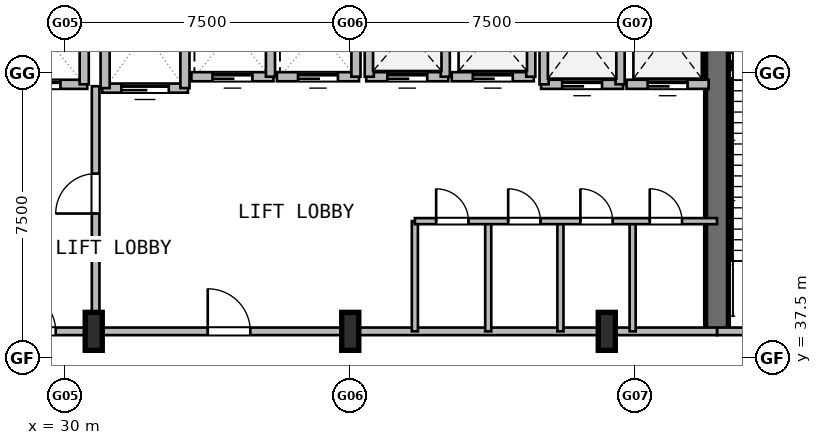
"""IFC4 building model, lengths in metres.
Left out: names, types, materials, properties, quantities, classifications, styles, units other than length and angle.
Written with IfcOpenShell. Run it as: python <this file> out.ifc"""

import sys

from ifc_helpers import new_model, si_unit, direction, frame, frame_2d, origin, origin_2d, place, context, subcontext, project, spatial, rectangle, i_section, extrude, element, fill, save


model = new_model("IFC4")
c1 = context("Model", 3, precision=1e-05, world=origin(), true_north=direction((0.0, 1.0)))
c2 = subcontext(c1, "Body", "Model", "MODEL_VIEW")
j1 = project(units=[si_unit("LENGTHUNIT", "METRE"), si_unit("PLANEANGLEUNIT", "RADIAN")], contexts=[c1])
p1 = place(None, origin())
s1 = spatial("IfcSite", under=j1, at=p1, CompositionType="ELEMENT")
p2 = place(p1, origin())
s2 = spatial("IfcBuilding", under=s1, at=p2, CompositionType="ELEMENT")
p3 = place(p2, origin())
s3 = spatial("IfcBuildingStorey", under=s2, at=p3, CompositionType="ELEMENT", Elevation=0.0)
p4 = place(p3, frame((47.15, 38.2, 0.0), z_axis=(0.0, 0.0, 1.0), x_axis=(0.0, 1.0, 0.0)))
e1 = element("IfcWall", 1, at=p4, inside=s3, PredefinedType="SHEAR", context=c2, shape_type="SweptSolid", body=[
    extrude(rectangle(XDim=9.8, YDim=0.6, at=frame_2d((4.9, 0.0))), origin(), (0.0, 0.0, 1.0), 6.0),
])
for number, where, z_axis, x_axis in (
    (2, (30.75, 38.2, 0.0), (0.0, 0.0, 1.0), (1.0, 0.0, 0.0)),
    (3, (37.5, 38.2, 0.0), (0.0, 0.0, 1.0), (1.0, 0.0, 0.0)),
    (4, (44.25, 38.2, 0.0), (0.0, 0.0, 1.0), (1.0, 0.0, 0.0)),
):
    element("IfcColumn", number, at=place(p3, frame(where, z_axis=z_axis, x_axis=x_axis)), inside=s3, PredefinedType="COLUMN", context=c2, shape_type="SweptSolid", body=[
        extrude(i_section(OverallWidth=0.45, OverallDepth=1.0, WebThickness=0.022, FlangeThickness=0.04, at=origin_2d()), origin(), (0.0, 0.0, 1.0), 6.0),
    ])
p5 = place(p3, frame((51.0, 38.2, 0.0), z_axis=(0.0, 0.0, 1.0), x_axis=(-1.0, 0.0, 0.0)))
e5 = element("IfcWall", 5, at=p5, inside=s3, PredefinedType="PARTITIONING", context=c2, shape_type="SweptSolid", body=[
    extrude(rectangle(XDim=3.85, YDim=0.2, at=frame_2d((1.925, 0.0))), origin(), (0.0, 0.0, 1.0), 4.88),
])
p6 = place(p5, frame((0.75, 0.0, 0.0)))
e6 = element("IfcOpeningElement", 6, at=p6, cuts=e5, PredefinedType="OPENING", context=c2, shape_type="SweptSolid", body=[
    extrude(rectangle(XDim=1.12, YDim=2.1, at=frame_2d((0.56, 1.05))), frame((0.0, 0.11, 0.0), z_axis=(0.0, -1.0, 0.0), x_axis=(1.0, 0.0, 0.0)), (0.0, 0.0, 1.0), 0.22),
])
p7 = place(p3, frame((30.8, 38.2, 0.0), z_axis=(0.0, 0.0, 1.0), x_axis=(0.0, 1.0, 0.0)))
e7 = element("IfcWall", 7, at=p7, inside=s3, PredefinedType="PARTITIONING", context=c2, shape_type="SweptSolid", body=[
    extrude(rectangle(XDim=6.45, YDim=0.2, at=frame_2d((3.225, 0.0))), origin(), (0.0, 0.0, 1.0), 4.88),
])
p8 = place(p7, frame((3.1, 0.0, 0.0)))
e8 = element("IfcOpeningElement", 8, at=p8, cuts=e7, PredefinedType="OPENING", context=c2, shape_type="SweptSolid", body=[
    extrude(rectangle(XDim=1.05, YDim=2.1, at=frame_2d((0.525, 1.05))), frame((0.0, 0.11, 0.0), z_axis=(0.0, -1.0, 0.0), x_axis=(1.0, 0.0, 0.0)), (0.0, 0.0, 1.0), 0.22),
])
p9 = place(p3, frame((27.95, 38.2, 0.0), z_axis=(0.0, 0.0, 1.0), x_axis=(1.0, 0.0, 0.0)))
e9 = element("IfcWall", 9, at=p9, inside=s3, PredefinedType="PARTITIONING", context=c2, shape_type="SweptSolid", body=[
    extrude(rectangle(XDim=2.85, YDim=0.2, at=frame_2d((1.425, 0.0))), origin(), (0.0, 0.0, 1.0), 4.88),
])
p10 = place(p9, frame((0.75, 0.0, 0.0)))
e10 = element("IfcOpeningElement", 10, at=p10, cuts=e9, PredefinedType="OPENING", context=c2, shape_type="SweptSolid", body=[
    extrude(rectangle(XDim=1.05, YDim=2.1, at=frame_2d((0.525, 1.05))), frame((0.0, 0.11, 0.0), z_axis=(0.0, -1.0, 0.0), x_axis=(1.0, 0.0, 0.0)), (0.0, 0.0, 1.0), 0.22),
])
p11 = place(p3, frame((30.8, 38.2, 0.0), z_axis=(0.0, 0.0, 1.0), x_axis=(1.0, 0.0, 0.0)))
e11 = element("IfcWall", 11, at=p11, inside=s3, PredefinedType="PARTITIONING", context=c2, shape_type="SweptSolid", body=[
    extrude(rectangle(XDim=16.35, YDim=0.2, at=frame_2d((8.175, 0.0))), origin(), (0.0, 0.0, 1.0), 4.88),
])
p12 = place(p11, frame((2.95, 0.0, 0.0)))
e12 = element("IfcOpeningElement", 12, at=p12, cuts=e11, PredefinedType="OPENING", context=c2, shape_type="SweptSolid", body=[
    extrude(rectangle(XDim=1.12, YDim=2.1, at=frame_2d((0.56, 1.05))), frame((0.0, 0.11, 0.0), z_axis=(0.0, -1.0, 0.0), x_axis=(1.0, 0.0, 0.0)), (0.0, 0.0, 1.0), 0.22),
])
p13 = place(p3, frame((28.22, 44.7, 0.0), z_axis=(0.0, 0.0, 1.0), x_axis=(1.0, 0.0, 0.0)))
e13 = element("IfcWall", 13, at=p13, inside=s3, PredefinedType="PARTITIONING", context=c2, shape_type="SweptSolid", body=[
    extrude(rectangle(XDim=2.36, YDim=0.24, at=frame_2d((1.18, 0.0))), origin(), (0.0, 0.0, 1.0), 5.68),
])
p14 = place(p13, frame((0.705, 0.0, 0.0)))
e14 = element("IfcOpeningElement", 14, at=p14, cuts=e13, PredefinedType="OPENING", context=c2, shape_type="SweptSolid", body=[
    extrude(rectangle(XDim=0.95, YDim=2.15, at=frame_2d((0.475, 1.075))), frame((0.0, 0.13, 0.0), z_axis=(0.0, -1.0, 0.0), x_axis=(1.0, 0.0, 0.0)), (0.0, 0.0, 1.0), 0.26),
])
p15 = place(p3, frame((30.5, 44.7, 0.0), z_axis=(0.0, 0.0, 1.0), x_axis=(0.0, 1.0, 0.0)))
e15 = element("IfcWall", 15, at=p15, inside=s3, PredefinedType="PARTITIONING", context=c2, shape_type="SweptSolid", body=[
    extrude(rectangle(XDim=2.7, YDim=0.24, at=frame_2d((1.35, 0.0))), origin(), (0.0, 0.0, 1.0), 4.88),
])
p16 = place(p3, frame((30.97, 44.6, 0.0), z_axis=(0.0, 0.0, 1.0), x_axis=(1.0, 0.0, 0.0)))
e16 = element("IfcWall", 16, at=p16, inside=s3, PredefinedType="PARTITIONING", context=c2, shape_type="SweptSolid", body=[
    extrude(rectangle(XDim=2.26, YDim=0.24, at=frame_2d((1.13, 0.0))), origin(), (0.0, 0.0, 1.0), 5.68),
])
p17 = place(p16, frame((0.505, 0.0, 0.0)))
e17 = element("IfcOpeningElement", 17, at=p17, cuts=e16, PredefinedType="OPENING", context=c2, shape_type="SweptSolid", body=[
    extrude(rectangle(XDim=1.25, YDim=2.2, at=frame_2d((0.625, 1.1))), frame((0.0, 0.13, 0.0), z_axis=(0.0, -1.0, 0.0), x_axis=(1.0, 0.0, 0.0)), (0.0, 0.0, 1.0), 0.26),
])
p18 = place(p3, frame((31.05, 44.6, 0.0), z_axis=(0.0, 0.0, 1.0), x_axis=(0.0, 1.0, 0.0)))
e18 = element("IfcWall", 18, at=p18, inside=s3, PredefinedType="PARTITIONING", context=c2, shape_type="SweptSolid", body=[
    extrude(rectangle(XDim=2.9, YDim=0.24, at=frame_2d((1.45, 0.0))), origin(), (0.0, 0.0, 1.0), 4.88),
])
p19 = place(p3, frame((33.15, 44.6, 0.0), z_axis=(0.0, 0.0, 1.0), x_axis=(0.0, 1.0, 0.0)))
e19 = element("IfcWall", 19, at=p19, inside=s3, PredefinedType="PARTITIONING", context=c2, shape_type="SweptSolid", body=[
    extrude(rectangle(XDim=2.9, YDim=0.24, at=frame_2d((1.45, 0.0))), origin(), (0.0, 0.0, 1.0), 5.68),
])
p20 = place(p3, frame((33.32, 44.9, 0.0), z_axis=(0.0, 0.0, 1.0), x_axis=(1.0, 0.0, 0.0)))
e20 = element("IfcWall", 20, at=p20, inside=s3, PredefinedType="PARTITIONING", context=c2, shape_type="SweptSolid", body=[
    extrude(rectangle(XDim=2.16, YDim=0.24, at=frame_2d((1.08, 0.0))), origin(), (0.0, 0.0, 1.0), 5.68),
])
p21 = place(p20, frame((0.555, 0.0, 0.0)))
e21 = element("IfcOpeningElement", 21, at=p21, cuts=e20, PredefinedType="OPENING", context=c2, shape_type="SweptSolid", body=[
    extrude(rectangle(XDim=1.05, YDim=2.15, at=frame_2d((0.525, 1.075))), frame((0.0, 0.13, 0.0), z_axis=(0.0, -1.0, 0.0), x_axis=(1.0, 0.0, 0.0)), (0.0, 0.0, 1.0), 0.26),
])
p22 = place(p3, frame((35.4, 44.9, 0.0), z_axis=(0.0, 0.0, 1.0), x_axis=(0.0, 1.0, 0.0)))
e22 = element("IfcWall", 22, at=p22, inside=s3, PredefinedType="PARTITIONING", context=c2, shape_type="SweptSolid", body=[
    extrude(rectangle(XDim=2.4, YDim=0.24, at=frame_2d((1.2, 0.0))), origin(), (0.0, 0.0, 1.0), 5.68),
])
p23 = place(p3, frame((35.57, 44.9, 0.0), z_axis=(0.0, 0.0, 1.0), x_axis=(1.0, 0.0, 0.0)))
e23 = element("IfcWall", 23, at=p23, inside=s3, PredefinedType="PARTITIONING", context=c2, shape_type="SweptSolid", body=[
    extrude(rectangle(XDim=2.16, YDim=0.24, at=frame_2d((1.08, 0.0))), origin(), (0.0, 0.0, 1.0), 5.68),
])
p24 = place(p23, frame((0.555, 0.0, 0.0)))
e24 = element("IfcOpeningElement", 24, at=p24, cuts=e23, PredefinedType="OPENING", context=c2, shape_type="SweptSolid", body=[
    extrude(rectangle(XDim=1.05, YDim=2.15, at=frame_2d((0.525, 1.075))), frame((0.0, 0.13, 0.0), z_axis=(0.0, -1.0, 0.0), x_axis=(1.0, 0.0, 0.0)), (0.0, 0.0, 1.0), 0.26),
])
p25 = place(p3, frame((37.65, 44.9, 0.0), z_axis=(0.0, 0.0, 1.0), x_axis=(0.0, 1.0, 0.0)))
e25 = element("IfcWall", 25, at=p25, inside=s3, PredefinedType="PARTITIONING", context=c2, shape_type="SweptSolid", body=[
    extrude(rectangle(XDim=2.4, YDim=0.24, at=frame_2d((1.2, 0.0))), origin(), (0.0, 0.0, 1.0), 5.68),
])
p26 = place(p3, frame((37.92, 44.9, 0.0), z_axis=(0.0, 0.0, 1.0), x_axis=(1.0, 0.0, 0.0)))
e26 = element("IfcWall", 26, at=p26, inside=s3, PredefinedType="PARTITIONING", context=c2, shape_type="SweptSolid", body=[
    extrude(rectangle(XDim=2.16, YDim=0.24, at=frame_2d((1.08, 0.0))), origin(), (0.0, 0.0, 1.0), 5.68),
])
p27 = place(p26, frame((0.555, 0.0, 0.0)))
e27 = element("IfcOpeningElement", 27, at=p27, cuts=e26, PredefinedType="OPENING", context=c2, shape_type="SweptSolid", body=[
    extrude(rectangle(XDim=1.05, YDim=2.15, at=frame_2d((0.525, 1.075))), frame((0.0, 0.13, 0.0), z_axis=(0.0, -1.0, 0.0), x_axis=(1.0, 0.0, 0.0)), (0.0, 0.0, 1.0), 0.26),
])
for number, where, z_axis, x_axis in (
    (28, (38.0, 44.9, 0.0), (0.0, 0.0, 1.0), (0.0, 1.0, 0.0)),
    (29, (40.0, 44.9, 0.0), (0.0, 0.0, 1.0), (0.0, 1.0, 0.0)),
):
    element("IfcWall", number, at=place(p3, frame(where, z_axis=z_axis, x_axis=x_axis)), inside=s3, PredefinedType="PARTITIONING", context=c2, shape_type="SweptSolid", body=[
        extrude(rectangle(XDim=2.4, YDim=0.24, at=frame_2d((1.2, 0.0))), origin(), (0.0, 0.0, 1.0), 5.68),
    ])
p28 = place(p3, frame((40.17, 44.9, 0.0), z_axis=(0.0, 0.0, 1.0), x_axis=(1.0, 0.0, 0.0)))
e30 = element("IfcWall", 30, at=p28, inside=s3, PredefinedType="PARTITIONING", context=c2, shape_type="SweptSolid", body=[
    extrude(rectangle(XDim=2.16, YDim=0.24, at=frame_2d((1.08, 0.0))), origin(), (0.0, 0.0, 1.0), 5.68),
])
p29 = place(p28, frame((0.555, 0.0, 0.0)))
e31 = element("IfcOpeningElement", 31, at=p29, cuts=e30, PredefinedType="OPENING", context=c2, shape_type="SweptSolid", body=[
    extrude(rectangle(XDim=1.05, YDim=2.15, at=frame_2d((0.525, 1.075))), frame((0.0, 0.13, 0.0), z_axis=(0.0, -1.0, 0.0), x_axis=(1.0, 0.0, 0.0)), (0.0, 0.0, 1.0), 0.26),
])
p30 = place(p3, frame((42.25, 44.9, 0.0), z_axis=(0.0, 0.0, 1.0), x_axis=(0.0, 1.0, 0.0)))
e32 = element("IfcWall", 32, at=p30, inside=s3, PredefinedType="PARTITIONING", context=c2, shape_type="SweptSolid", body=[
    extrude(rectangle(XDim=2.4, YDim=0.24, at=frame_2d((1.2, 0.0))), origin(), (0.0, 0.0, 1.0), 5.68),
])
p31 = place(p3, frame((42.52, 44.7, 0.0), z_axis=(0.0, 0.0, 1.0), x_axis=(1.0, 0.0, 0.0)))
e33 = element("IfcWall", 33, at=p31, inside=s3, PredefinedType="PARTITIONING", context=c2, shape_type="SweptSolid", body=[
    extrude(rectangle(XDim=2.16, YDim=0.24, at=frame_2d((1.08, 0.0))), origin(), (0.0, 0.0, 1.0), 5.68),
])
p32 = place(p31, frame((0.555, 0.0, 0.0)))
e34 = element("IfcOpeningElement", 34, at=p32, cuts=e33, PredefinedType="OPENING", context=c2, shape_type="SweptSolid", body=[
    extrude(rectangle(XDim=1.05, YDim=2.15, at=frame_2d((0.525, 1.075))), frame((0.0, 0.13, 0.0), z_axis=(0.0, -1.0, 0.0), x_axis=(1.0, 0.0, 0.0)), (0.0, 0.0, 1.0), 0.26),
])
for number, where, z_axis, x_axis in (
    (35, (42.6, 44.7, 0.0), (0.0, 0.0, 1.0), (0.0, 1.0, 0.0)),
    (36, (44.6, 44.7, 0.0), (0.0, 0.0, 1.0), (0.0, 1.0, 0.0)),
):
    element("IfcWall", number, at=place(p3, frame(where, z_axis=z_axis, x_axis=x_axis)), inside=s3, PredefinedType="PARTITIONING", context=c2, shape_type="SweptSolid", body=[
        extrude(rectangle(XDim=2.7, YDim=0.24, at=frame_2d((1.35, 0.0))), origin(), (0.0, 0.0, 1.0), 5.68),
    ])
p33 = place(p3, frame((44.77, 44.7, 0.0), z_axis=(0.0, 0.0, 1.0), x_axis=(1.0, 0.0, 0.0)))
e37 = element("IfcWall", 37, at=p33, inside=s3, PredefinedType="PARTITIONING", context=c2, shape_type="SweptSolid", body=[
    extrude(rectangle(XDim=2.16, YDim=0.24, at=frame_2d((1.08, 0.0))), origin(), (0.0, 0.0, 1.0), 5.68),
])
p34 = place(p33, frame((0.555, 0.0, 0.0)))
e38 = element("IfcOpeningElement", 38, at=p34, cuts=e37, PredefinedType="OPENING", context=c2, shape_type="SweptSolid", body=[
    extrude(rectangle(XDim=1.05, YDim=2.15, at=frame_2d((0.525, 1.075))), frame((0.0, 0.13, 0.0), z_axis=(0.0, -1.0, 0.0), x_axis=(1.0, 0.0, 0.0)), (0.0, 0.0, 1.0), 0.26),
])
for number, where, z_axis, x_axis in (
    (39, (39.2, 38.2, 0.0), (0.0, 0.0, 1.0), (0.0, 1.0, 0.0)),
    (40, (41.13, 38.2, 0.0), (0.0, 0.0, 1.0), (0.0, 1.0, 0.0)),
    (41, (43.03, 38.2, 0.0), (0.0, 0.0, 1.0), (0.0, 1.0, 0.0)),
    (42, (44.93, 38.2, 0.0), (0.0, 0.0, 1.0), (0.0, 1.0, 0.0)),
):
    element("IfcWall", number, at=place(p3, frame(where, z_axis=z_axis, x_axis=x_axis)), inside=s3, PredefinedType="PARTITIONING", context=c2, shape_type="SweptSolid", body=[
        extrude(rectangle(XDim=2.9, YDim=0.16, at=frame_2d((1.45, 0.0))), origin(), (0.0, 0.0, 1.0), 5.68),
    ])
p35 = place(p3, frame((39.2, 41.1, 0.0), z_axis=(0.0, 0.0, 1.0), x_axis=(1.0, 0.0, 0.0)))
e43 = element("IfcWall", 43, at=p35, inside=s3, PredefinedType="PARTITIONING", context=c2, shape_type="SweptSolid", body=[
    extrude(rectangle(XDim=7.95, YDim=0.16, at=frame_2d((3.975, 0.0))), origin(), (0.0, 0.0, 1.0), 5.68),
])
p36 = place(p35, frame((0.56, 0.0, 0.0)))
e44 = element("IfcOpeningElement", 44, at=p36, cuts=e43, PredefinedType="OPENING", context=c2, shape_type="SweptSolid", body=[
    extrude(rectangle(XDim=0.85, YDim=2.05, at=frame_2d((0.425, 1.025))), frame((0.0, 0.09, 0.0), z_axis=(0.0, -1.0, 0.0), x_axis=(1.0, 0.0, 0.0)), (0.0, 0.0, 1.0), 0.18),
])
p37 = place(p35, frame((2.455, 0.0, 0.0)))
e45 = element("IfcOpeningElement", 45, at=p37, cuts=e43, PredefinedType="OPENING", context=c2, shape_type="SweptSolid", body=[
    extrude(rectangle(XDim=0.85, YDim=2.05, at=frame_2d((0.425, 1.025))), frame((0.0, 0.09, 0.0), z_axis=(0.0, -1.0, 0.0), x_axis=(1.0, 0.0, 0.0)), (0.0, 0.0, 1.0), 0.18),
])
p38 = place(p35, frame((4.355, 0.0, 0.0)))
e46 = element("IfcOpeningElement", 46, at=p38, cuts=e43, PredefinedType="OPENING", context=c2, shape_type="SweptSolid", body=[
    extrude(rectangle(XDim=0.85, YDim=2.05, at=frame_2d((0.425, 1.025))), frame((0.0, 0.09, 0.0), z_axis=(0.0, -1.0, 0.0), x_axis=(1.0, 0.0, 0.0)), (0.0, 0.0, 1.0), 0.18),
])
p39 = place(p35, frame((6.18, 0.0, 0.0)))
e47 = element("IfcOpeningElement", 47, at=p39, cuts=e43, PredefinedType="OPENING", context=c2, shape_type="SweptSolid", body=[
    extrude(rectangle(XDim=0.85, YDim=2.05, at=frame_2d((0.425, 1.025))), frame((0.0, 0.09, 0.0), z_axis=(0.0, -1.0, 0.0), x_axis=(1.0, 0.0, 0.0)), (0.0, 0.0, 1.0), 0.18),
])
p40 = place(p8, origin())
e48 = element("IfcDoor", 48, at=p40, inside=s3, OperationType="SINGLE_SWING_LEFT", PredefinedType="DOOR", context=c2, shape_type="SweptSolid", body=[
    extrude(rectangle(XDim=1.05, YDim=2.1, at=frame_2d((0.525, 1.05))), frame((0.0, 0.025, 0.0), z_axis=(0.0, -1.0, 0.0), x_axis=(1.0, 0.0, 0.0)), (0.0, 0.0, 1.0), 0.05),
])
fill(e8, e48)
p41 = place(p10, origin())
e49 = element("IfcDoor", 49, at=p41, inside=s3, OperationType="SINGLE_SWING_RIGHT", PredefinedType="DOOR", context=c2, shape_type="SweptSolid", body=[
    extrude(rectangle(XDim=1.05, YDim=2.1, at=frame_2d((0.525, 1.05))), frame((0.0, 0.025, 0.0), z_axis=(0.0, -1.0, 0.0), x_axis=(1.0, 0.0, 0.0)), (0.0, 0.0, 1.0), 0.05),
])
fill(e10, e49)
p42 = place(p12, origin())
e50 = element("IfcDoor", 50, at=p42, inside=s3, OperationType="SINGLE_SWING_LEFT", PredefinedType="DOOR", context=c2, shape_type="SweptSolid", body=[
    extrude(rectangle(XDim=1.12, YDim=2.1, at=frame_2d((0.56, 1.05))), frame((0.0, 0.025, 0.0), z_axis=(0.0, -1.0, 0.0), x_axis=(1.0, 0.0, 0.0)), (0.0, 0.0, 1.0), 0.05),
])
fill(e12, e50)
p43 = place(p14, origin())
e51 = element("IfcDoor", 51, at=p43, inside=s3, OperationType="SLIDING_TO_LEFT", PredefinedType="DOOR", context=c2, shape_type="SweptSolid", body=[
    extrude(rectangle(XDim=0.95, YDim=2.15, at=frame_2d((0.475, 1.075))), frame((0.0, 0.025, 0.0), z_axis=(0.0, -1.0, 0.0), x_axis=(1.0, 0.0, 0.0)), (0.0, 0.0, 1.0), 0.05),
])
fill(e14, e51)
p44 = place(p17, origin())
e52 = element("IfcDoor", 52, at=p44, inside=s3, OperationType="SLIDING_TO_LEFT", PredefinedType="DOOR", context=c2, shape_type="SweptSolid", body=[
    extrude(rectangle(XDim=1.25, YDim=2.2, at=frame_2d((0.625, 1.1))), frame((0.0, 0.025, 0.0), z_axis=(0.0, -1.0, 0.0), x_axis=(1.0, 0.0, 0.0)), (0.0, 0.0, 1.0), 0.05),
])
fill(e17, e52)
p45 = place(p21, origin())
e53 = element("IfcDoor", 53, at=p45, inside=s3, OperationType="SLIDING_TO_LEFT", PredefinedType="DOOR", context=c2, shape_type="SweptSolid", body=[
    extrude(rectangle(XDim=1.05, YDim=2.15, at=frame_2d((0.525, 1.075))), frame((0.0, 0.025, 0.0), z_axis=(0.0, -1.0, 0.0), x_axis=(1.0, 0.0, 0.0)), (0.0, 0.0, 1.0), 0.05),
])
fill(e21, e53)
p46 = place(p24, origin())
e54 = element("IfcDoor", 54, at=p46, inside=s3, OperationType="SLIDING_TO_LEFT", PredefinedType="DOOR", context=c2, shape_type="SweptSolid", body=[
    extrude(rectangle(XDim=1.05, YDim=2.15, at=frame_2d((0.525, 1.075))), frame((0.0, 0.025, 0.0), z_axis=(0.0, -1.0, 0.0), x_axis=(1.0, 0.0, 0.0)), (0.0, 0.0, 1.0), 0.05),
])
fill(e24, e54)
p47 = place(p27, origin())
e55 = element("IfcDoor", 55, at=p47, inside=s3, OperationType="SLIDING_TO_LEFT", PredefinedType="DOOR", context=c2, shape_type="SweptSolid", body=[
    extrude(rectangle(XDim=1.05, YDim=2.15, at=frame_2d((0.525, 1.075))), frame((0.0, 0.025, 0.0), z_axis=(0.0, -1.0, 0.0), x_axis=(1.0, 0.0, 0.0)), (0.0, 0.0, 1.0), 0.05),
])
fill(e27, e55)
p48 = place(p29, origin())
e56 = element("IfcDoor", 56, at=p48, inside=s3, OperationType="SLIDING_TO_LEFT", PredefinedType="DOOR", context=c2, shape_type="SweptSolid", body=[
    extrude(rectangle(XDim=1.05, YDim=2.15, at=frame_2d((0.525, 1.075))), frame((0.0, 0.025, 0.0), z_axis=(0.0, -1.0, 0.0), x_axis=(1.0, 0.0, 0.0)), (0.0, 0.0, 1.0), 0.05),
])
fill(e31, e56)
p49 = place(p32, origin())
e57 = element("IfcDoor", 57, at=p49, inside=s3, OperationType="SLIDING_TO_LEFT", PredefinedType="DOOR", context=c2, shape_type="SweptSolid", body=[
    extrude(rectangle(XDim=1.05, YDim=2.15, at=frame_2d((0.525, 1.075))), frame((0.0, 0.025, 0.0), z_axis=(0.0, -1.0, 0.0), x_axis=(1.0, 0.0, 0.0)), (0.0, 0.0, 1.0), 0.05),
])
fill(e34, e57)
p50 = place(p34, origin())
e58 = element("IfcDoor", 58, at=p50, inside=s3, OperationType="SLIDING_TO_LEFT", PredefinedType="DOOR", context=c2, shape_type="SweptSolid", body=[
    extrude(rectangle(XDim=1.05, YDim=2.15, at=frame_2d((0.525, 1.075))), frame((0.0, 0.025, 0.0), z_axis=(0.0, -1.0, 0.0), x_axis=(1.0, 0.0, 0.0)), (0.0, 0.0, 1.0), 0.05),
])
fill(e38, e58)
p51 = place(p36, origin())
e59 = element("IfcDoor", 59, at=p51, inside=s3, OperationType="SINGLE_SWING_RIGHT", PredefinedType="DOOR", context=c2, shape_type="SweptSolid", body=[
    extrude(rectangle(XDim=0.85, YDim=2.05, at=frame_2d((0.425, 1.025))), frame((0.0, 0.025, 0.0), z_axis=(0.0, -1.0, 0.0), x_axis=(1.0, 0.0, 0.0)), (0.0, 0.0, 1.0), 0.05),
])
fill(e44, e59)
p52 = place(p37, origin())
e60 = element("IfcDoor", 60, at=p52, inside=s3, OperationType="SINGLE_SWING_LEFT", PredefinedType="DOOR", context=c2, shape_type="SweptSolid", body=[
    extrude(rectangle(XDim=0.85, YDim=2.05, at=frame_2d((0.425, 1.025))), frame((0.0, 0.025, 0.0), z_axis=(0.0, -1.0, 0.0), x_axis=(1.0, 0.0, 0.0)), (0.0, 0.0, 1.0), 0.05),
])
fill(e45, e60)
p53 = place(p38, origin())
e61 = element("IfcDoor", 61, at=p53, inside=s3, OperationType="SINGLE_SWING_RIGHT", PredefinedType="DOOR", context=c2, shape_type="SweptSolid", body=[
    extrude(rectangle(XDim=0.85, YDim=2.05, at=frame_2d((0.425, 1.025))), frame((0.0, 0.025, 0.0), z_axis=(0.0, -1.0, 0.0), x_axis=(1.0, 0.0, 0.0)), (0.0, 0.0, 1.0), 0.05),
])
fill(e46, e61)
p54 = place(p39, origin())
e62 = element("IfcDoor", 62, at=p54, inside=s3, OperationType="SINGLE_SWING_LEFT", PredefinedType="DOOR", context=c2, shape_type="SweptSolid", body=[
    extrude(rectangle(XDim=0.85, YDim=2.05, at=frame_2d((0.425, 1.025))), frame((0.0, 0.025, 0.0), z_axis=(0.0, -1.0, 0.0), x_axis=(1.0, 0.0, 0.0)), (0.0, 0.0, 1.0), 0.05),
])
fill(e47, e62)
save(model, sys.argv[1])
